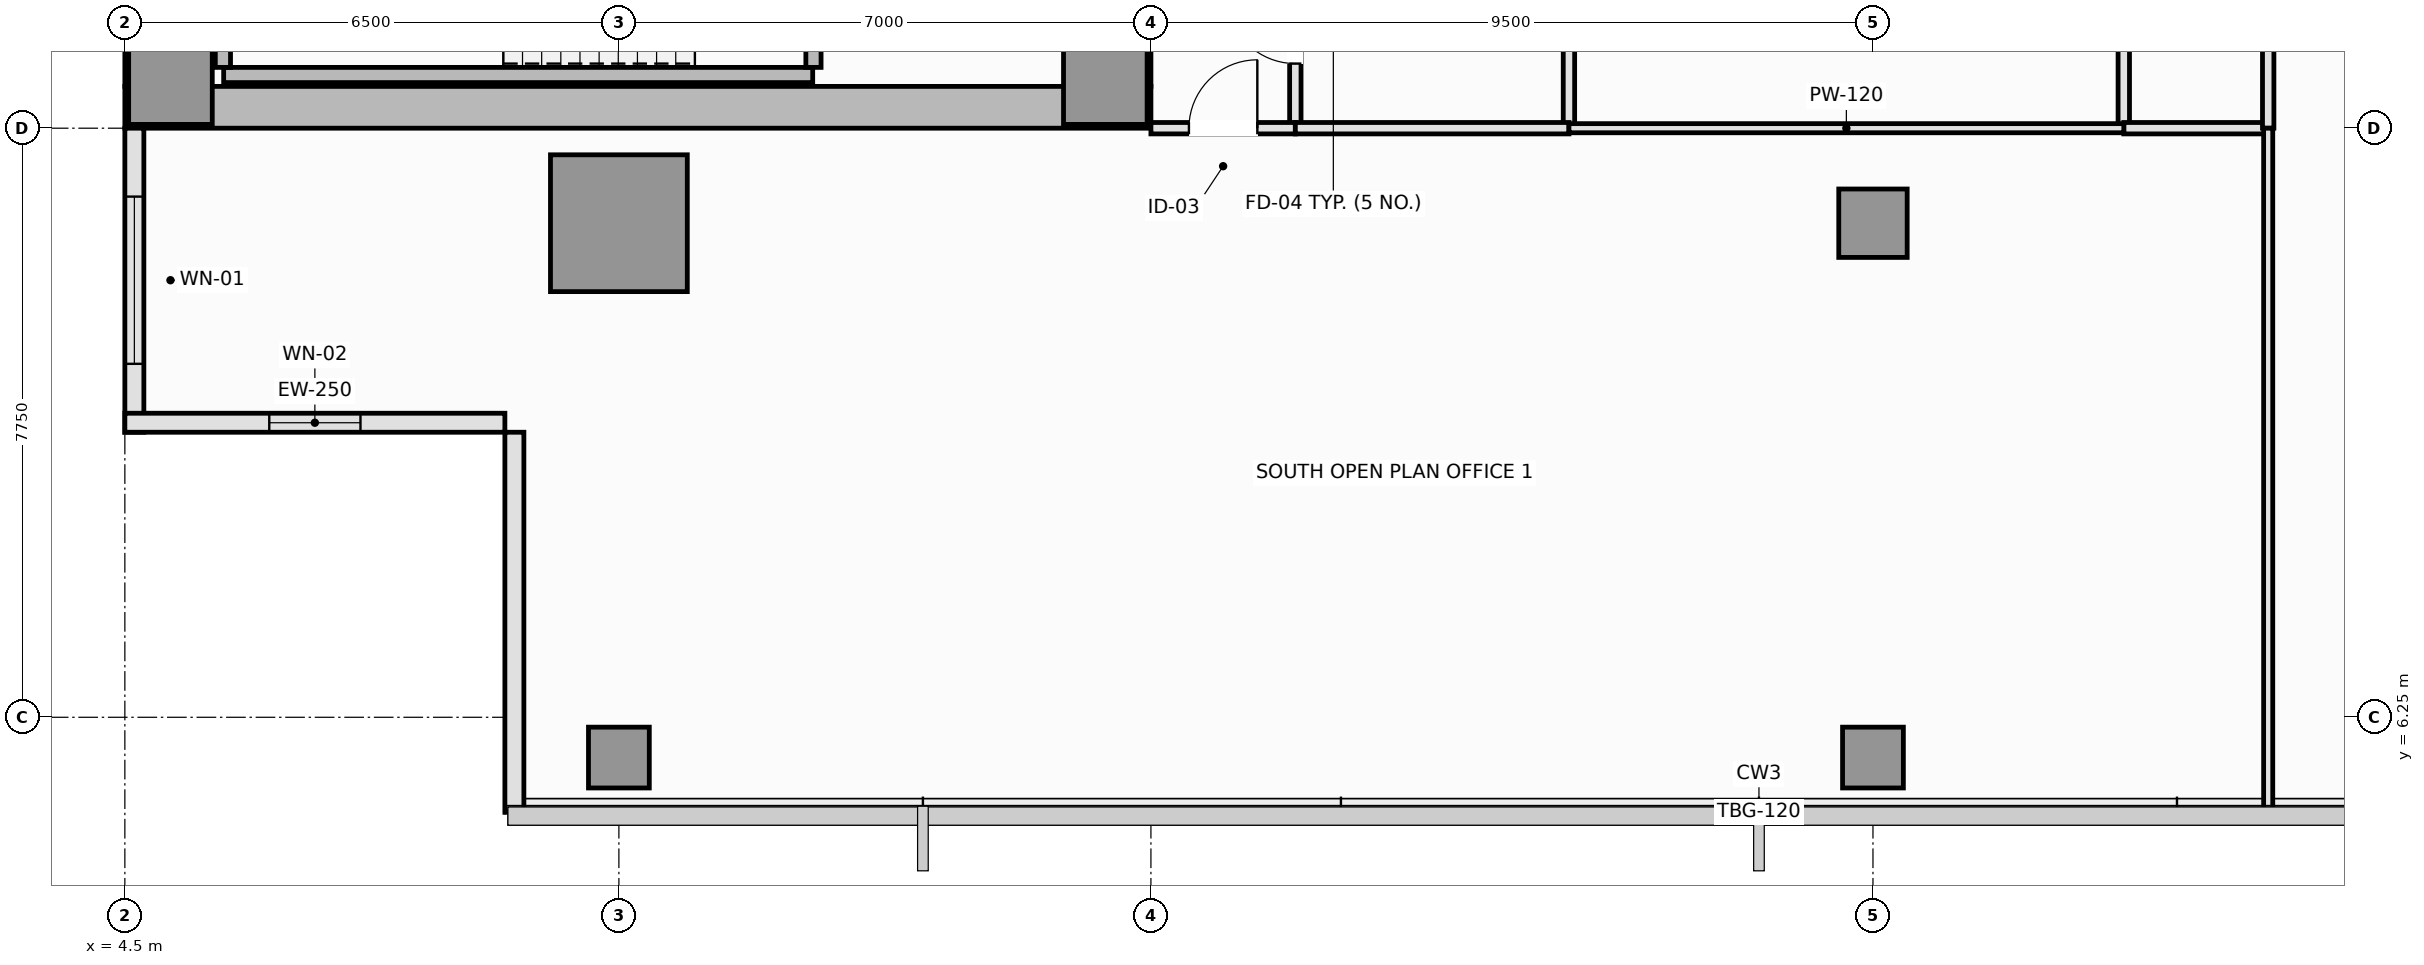
"""IFC4 building model, lengths in metres.
Left out: names, types, materials, properties, quantities, classifications, styles, units other than length and angle.
Written with IfcOpenShell. Run it as: python <this file> out.ifc"""

import sys

from ifc_helpers import new_model, si_unit, direction, frame, frame_2d, origin, origin_2d, place, context, subcontext, project, spatial, rectangle, extrude, element, fill, save


model = new_model("IFC4")
c1 = context("Model", 3, precision=1e-05, world=origin(), true_north=direction((0.0, 1.0)))
c2 = subcontext(c1, "Body", "Model", "MODEL_VIEW")
j1 = project(units=[si_unit("LENGTHUNIT", "METRE"), si_unit("PLANEANGLEUNIT", "RADIAN")], contexts=[c1])
p1 = place(None, origin())
s1 = spatial("IfcSite", under=j1, at=p1, CompositionType="ELEMENT")
p2 = place(p1, origin())
s2 = spatial("IfcBuilding", under=s1, at=p2, CompositionType="ELEMENT")
p3 = place(p2, frame((0.0, 0.0, 188.05)))
s3 = spatial("IfcBuildingStorey", under=s2, at=p3, CompositionType="ELEMENT", Elevation=188.05)
p4 = place(p3, frame((4.5, 14.275, 0.0), z_axis=(0.0, 0.0, 1.0), x_axis=(1.0, 0.0, 0.0)))
e1 = element("IfcWall", 1, at=p4, inside=s3, PredefinedType="SHEAR", context=c2, shape_type="SweptSolid", body=[
    extrude(rectangle(XDim=13.5, YDim=0.55, at=frame_2d((6.75, 0.0))), origin(), (0.0, 0.0, 1.0), 3.55),
])
p5 = place(p3, frame((4.775, 14.55, 0.0), z_axis=(0.0, 0.0, 1.0), x_axis=(0.0, 1.0, 0.0)))
e2 = element("IfcWall", 2, at=p5, inside=s3, PredefinedType="SHEAR", context=c2, shape_type="SweptSolid", body=[
    extrude(rectangle(XDim=21.4, YDim=0.55, at=frame_2d((10.7, 0.0))), origin(), (0.0, 0.0, 1.0), 3.55),
])
p6 = place(p3, frame((17.725, 14.55, 0.0), z_axis=(0.0, 0.0, 1.0), x_axis=(0.0, 1.0, 0.0)))
e3 = element("IfcWall", 3, at=p6, inside=s3, PredefinedType="SHEAR", context=c2, shape_type="SweptSolid", body=[
    extrude(rectangle(XDim=8.9, YDim=0.55, at=frame_2d((4.45, 0.0))), origin(), (0.0, 0.0, 1.0), 3.55),
])
p7 = place(p6, frame((4.35, 0.0, 0.0)))
e4 = element("IfcOpeningElement", 4, at=p7, cuts=e3, PredefinedType="OPENING", context=c2, shape_type="SweptSolid", body=[
    extrude(rectangle(XDim=1.1, YDim=2.15, at=frame_2d((0.55, 1.075))), frame((0.0, 0.285, 0.0), z_axis=(0.0, -1.0, 0.0), x_axis=(1.0, 0.0, 0.0)), (0.0, 0.0, 1.0), 0.57),
])
for number, where, z_axis, x_axis in (
    (5, (5.1, 14.6, 0.0), (0.0, 0.0, 1.0), (1.0, 0.0, 0.0)),
    (6, (17.4, 14.6, 0.0), (0.0, 0.0, 1.0), (1.0, 0.0, 0.0)),
):
    element("IfcColumn", number, at=place(p3, frame(where, z_axis=z_axis, x_axis=x_axis)), inside=s3, PredefinedType="PILASTER", context=c2, shape_type="SweptSolid", body=[
        extrude(rectangle(XDim=1.1, YDim=1.1, at=origin_2d()), origin(), (0.0, 0.0, 1.0), 3.55),
    ])
p8 = place(p3, frame((11.0, 12.75, 0.0), z_axis=(0.0, 0.0, 1.0), x_axis=(1.0, 0.0, 0.0)))
e7 = element("IfcColumn", 7, at=p8, inside=s3, PredefinedType="COLUMN", context=c2, shape_type="SweptSolid", body=[
    extrude(rectangle(XDim=1.8, YDim=1.8, at=origin_2d()), origin(), (0.0, 0.0, 1.0), 3.55),
])
p9 = place(p3, frame((27.5, 12.75, 0.0), z_axis=(0.0, 0.0, 1.0), x_axis=(1.0, 0.0, 0.0)))
e8 = element("IfcColumn", 8, at=p9, inside=s3, PredefinedType="COLUMN", context=c2, shape_type="SweptSolid", body=[
    extrude(rectangle(XDim=0.9, YDim=0.9, at=origin_2d()), origin(), (0.0, 0.0, 1.0), 3.55),
])
for number, where, z_axis, x_axis in (
    (9, (11.0, 5.72, 0.0), (0.0, 0.0, 1.0), (1.0, 0.0, 0.0)),
    (10, (27.5, 5.72, 0.0), (0.0, 0.0, 1.0), (1.0, 0.0, 0.0)),
):
    element("IfcColumn", number, at=place(p3, frame(where, z_axis=z_axis, x_axis=x_axis)), inside=s3, PredefinedType="COLUMN", context=c2, shape_type="SweptSolid", body=[
        extrude(rectangle(XDim=0.8, YDim=0.8, at=origin_2d()), origin(), (0.0, 0.0, 1.0), 3.55),
    ])
p10 = place(p3, frame((4.625, 14.0, 0.0), z_axis=(0.0, 0.0, 1.0), x_axis=(0.0, -1.0, 0.0)))
e11 = element("IfcWall", 11, at=p10, inside=s3, PredefinedType="SOLIDWALL", context=c2, shape_type="SweptSolid", body=[
    extrude(rectangle(XDim=4.0, YDim=0.25, at=frame_2d((2.0, 0.0))), origin(), (0.0, 0.0, 1.0), 3.37),
])
p11 = place(p10, frame((0.9, 0.0, 0.9)))
e12 = element("IfcOpeningElement", 12, at=p11, cuts=e11, PredefinedType="OPENING", context=c2, shape_type="SweptSolid", body=[
    extrude(rectangle(XDim=2.2, YDim=1.8, at=frame_2d((1.1, 0.9))), frame((0.0, 0.135, 0.0), z_axis=(0.0, -1.0, 0.0), x_axis=(1.0, 0.0, 0.0)), (0.0, 0.0, 1.0), 0.27),
])
p12 = place(p3, frame((4.5, 10.125, 0.0), z_axis=(0.0, 0.0, 1.0), x_axis=(1.0, 0.0, 0.0)))
e13 = element("IfcWall", 13, at=p12, inside=s3, PredefinedType="SOLIDWALL", context=c2, shape_type="SweptSolid", body=[
    extrude(rectangle(XDim=5.0, YDim=0.25, at=frame_2d((2.5, 0.0))), origin(), (0.0, 0.0, 1.0), 3.37),
])
p13 = place(p12, frame((1.9, 0.0, 0.9)))
e14 = element("IfcOpeningElement", 14, at=p13, cuts=e13, PredefinedType="OPENING", context=c2, shape_type="SweptSolid", body=[
    extrude(rectangle(XDim=1.2, YDim=1.8, at=frame_2d((0.6, 0.9))), frame((0.0, 0.135, 0.0), z_axis=(0.0, -1.0, 0.0), x_axis=(1.0, 0.0, 0.0)), (0.0, 0.0, 1.0), 0.27),
])
p14 = place(p3, frame((9.625, 10.0, 0.0), z_axis=(0.0, 0.0, 1.0), x_axis=(0.0, -1.0, 0.0)))
e15 = element("IfcWall", 15, at=p14, inside=s3, PredefinedType="SOLIDWALL", context=c2, shape_type="SweptSolid", body=[
    extrude(rectangle(XDim=5.0, YDim=0.25, at=frame_2d((2.5, 0.0))), origin(), (0.0, 0.0, 1.0), 3.37),
])
p15 = place(p3, frame((5.8, 14.7, 0.0), z_axis=(0.0, 0.0, 1.0), x_axis=(1.0, 0.0, 0.0)))
e16 = element("IfcWall", 16, at=p15, inside=s3, PredefinedType="SOLIDWALL", context=c2, shape_type="SweptSolid", body=[
    extrude(rectangle(XDim=7.75, YDim=0.2, at=frame_2d((3.875, 0.0))), origin(), (0.0, 0.0, 1.0), 3.55),
])
p16 = place(p3, frame((5.79, 14.8, 0.0), z_axis=(0.0, 0.0, 1.0), x_axis=(0.0, 1.0, 0.0)))
e17 = element("IfcWall", 17, at=p16, inside=s3, PredefinedType="SOLIDWALL", context=c2, shape_type="SweptSolid", body=[
    extrude(rectangle(XDim=3.05, YDim=0.2, at=frame_2d((1.525, 0.0))), origin(), (0.0, 0.0, 1.0), 3.55),
])
p17 = place(p3, frame((13.56, 14.8, 0.0), z_axis=(0.0, 0.0, 1.0), x_axis=(0.0, 1.0, 0.0)))
e18 = element("IfcWall", 18, at=p17, inside=s3, PredefinedType="SOLIDWALL", context=c2, shape_type="SweptSolid", body=[
    extrude(rectangle(XDim=3.05, YDim=0.2, at=frame_2d((1.525, 0.0))), origin(), (0.0, 0.0, 1.0), 3.55),
])
p18 = place(p17, frame((0.95, 0.0, 0.0)))
e19 = element("IfcOpeningElement", 19, at=p18, cuts=e18, PredefinedType="OPENING", context=c2, shape_type="SweptSolid", body=[
    extrude(rectangle(XDim=1.15, YDim=2.15, at=frame_2d((0.575, 1.075))), frame((0.0, 0.11, 0.0), z_axis=(0.0, -1.0, 0.0), x_axis=(1.0, 0.0, 0.0)), (0.0, 0.0, 1.0), 0.22),
])
p19 = place(p3, frame((19.9, 14.0, 0.0), z_axis=(0.0, 0.0, 1.0), x_axis=(0.0, 1.0, 0.0)))
e20 = element("IfcWall", 20, at=p19, inside=s3, PredefinedType="PLUMBINGWALL", context=c2, shape_type="SweptSolid", body=[
    extrude(rectangle(XDim=2.6, YDim=0.15, at=frame_2d((1.3, 0.0))), origin(), (0.0, 0.0, 1.0), 3.37),
])
p20 = place(p19, frame((0.85, 0.0, 0.0)))
e21 = element("IfcOpeningElement", 21, at=p20, cuts=e20, PredefinedType="OPENING", context=c2, shape_type="SweptSolid", body=[
    extrude(rectangle(XDim=0.9, YDim=2.1, at=frame_2d((0.45, 1.05))), frame((0.0, 0.085, 0.0), z_axis=(0.0, -1.0, 0.0), x_axis=(1.0, 0.0, 0.0)), (0.0, 0.0, 1.0), 0.17),
])
p21 = place(p3, frame((18.0, 14.0, 0.0), z_axis=(0.0, 0.0, 1.0), x_axis=(1.0, 0.0, 0.0)))
e22 = element("IfcWall", 22, at=p21, inside=s3, PredefinedType="PARTITIONING", context=c2, shape_type="SweptSolid", body=[
    extrude(rectangle(XDim=1.9, YDim=0.15, at=frame_2d((0.95, 0.0))), origin(), (0.0, 0.0, 1.0), 3.37),
])
p22 = place(p21, frame((0.5, 0.0, 0.0)))
e23 = element("IfcOpeningElement", 23, at=p22, cuts=e22, PredefinedType="OPENING", context=c2, shape_type="SweptSolid", body=[
    extrude(rectangle(XDim=0.9, YDim=2.1, at=frame_2d((0.45, 1.05))), frame((0.0, 0.085, 0.0), z_axis=(0.0, -1.0, 0.0), x_axis=(1.0, 0.0, 0.0)), (0.0, 0.0, 1.0), 0.17),
])
p23 = place(p3, frame((30.8, 14.0, 0.0), z_axis=(0.0, 0.0, 1.0), x_axis=(0.0, 1.0, 0.0)))
e24 = element("IfcWall", 24, at=p23, inside=s3, PredefinedType="PARTITIONING", context=c2, shape_type="SweptSolid", body=[
    extrude(rectangle(XDim=4.7, YDim=0.15, at=frame_2d((2.35, 0.0))), origin(), (0.0, 0.0, 1.0), 3.37),
])
p24 = place(p23, frame((1.85, 0.0, 0.0)))
e25 = element("IfcOpeningElement", 25, at=p24, cuts=e24, PredefinedType="OPENING", context=c2, shape_type="SweptSolid", body=[
    extrude(rectangle(XDim=1.0, YDim=2.15, at=frame_2d((0.5, 1.075))), frame((0.0, 0.085, 0.0), z_axis=(0.0, -1.0, 0.0), x_axis=(1.0, 0.0, 0.0)), (0.0, 0.0, 1.0), 0.17),
])
p25 = place(p3, frame((30.8, 14.0, 0.0), z_axis=(0.0, 0.0, 1.0), x_axis=(1.0, 0.0, 0.0)))
e26 = element("IfcWall", 26, at=p25, inside=s3, PredefinedType="PARTITIONING", context=c2, shape_type="SweptSolid", body=[
    extrude(rectangle(XDim=1.9, YDim=0.15, at=frame_2d((0.95, 0.0))), origin(), (0.0, 0.0, 1.0), 3.37),
])
p26 = place(p3, frame((32.7, 14.0, 0.0), z_axis=(0.0, 0.0, 1.0), x_axis=(0.0, 1.0, 0.0)))
e27 = element("IfcWall", 27, at=p26, inside=s3, PredefinedType="PARTITIONING", context=c2, shape_type="SweptSolid", body=[
    extrude(rectangle(XDim=11.25, YDim=0.15, at=frame_2d((5.625, 0.0))), origin(), (0.0, 0.0, 1.0), 3.37),
])
p27 = place(p26, frame((5.125, 0.0, 0.0)))
e28 = element("IfcOpeningElement", 28, at=p27, cuts=e27, PredefinedType="OPENING", context=c2, shape_type="SweptSolid", body=[
    extrude(rectangle(XDim=1.0, YDim=2.15, at=frame_2d((0.5, 1.075))), frame((0.0, 0.085, 0.0), z_axis=(0.0, -1.0, 0.0), x_axis=(1.0, 0.0, 0.0)), (0.0, 0.0, 1.0), 0.17),
])
p28 = place(p3, frame((23.5, 14.0, 0.0), z_axis=(0.0, 0.0, 1.0), x_axis=(0.0, 1.0, 0.0)))
e29 = element("IfcWall", 29, at=p28, inside=s3, PredefinedType="PLUMBINGWALL", context=c2, shape_type="SweptSolid", body=[
    extrude(rectangle(XDim=2.6, YDim=0.15, at=frame_2d((1.3, 0.0))), origin(), (0.0, 0.0, 1.0), 3.37),
])
p29 = place(p3, frame((19.9, 14.0, 0.0), z_axis=(0.0, 0.0, 1.0), x_axis=(1.0, 0.0, 0.0)))
e30 = element("IfcWall", 30, at=p29, inside=s3, PredefinedType="PLUMBINGWALL", context=c2, shape_type="SweptSolid", body=[
    extrude(rectangle(XDim=3.6, YDim=0.15, at=frame_2d((1.8, 0.0))), origin(), (0.0, 0.0, 1.0), 3.37),
])
p30 = place(p3, frame((23.5, 14.0, 0.0), z_axis=(0.0, 0.0, 1.0), x_axis=(1.0, 0.0, 0.0)))
e31 = element("IfcWall", 31, at=p30, inside=s3, PredefinedType="PARTITIONING", context=c2, shape_type="SweptSolid", body=[
    extrude(rectangle(XDim=7.3, YDim=0.12, at=frame_2d((3.65, 0.0))), origin(), (0.0, 0.0, 1.0), 3.37),
])
p31 = place(p3, frame((32.7, 5.01, 0.0), z_axis=(0.0, 0.0, 1.0), x_axis=(0.0, 1.0, 0.0)))
e32 = element("IfcWall", 32, at=p31, inside=s3, PredefinedType="PARTITIONING", context=c2, shape_type="SweptSolid", body=[
    extrude(rectangle(XDim=8.99, YDim=0.12, at=frame_2d((4.495, 0.0))), origin(), (0.0, 0.0, 1.0), 3.37),
])
p32 = place(p11, origin())
e33 = element("IfcWindow", 33, at=p32, inside=s3, PartitioningType="SINGLE_PANEL", PredefinedType="WINDOW", context=c2, shape_type="SweptSolid", body=[
    extrude(rectangle(XDim=2.2, YDim=1.8, at=frame_2d((1.1, 0.9))), frame((0.0, 0.03, 0.0), z_axis=(0.0, -1.0, 0.0), x_axis=(1.0, 0.0, 0.0)), (0.0, 0.0, 1.0), 0.06),
])
fill(e12, e33)
p33 = place(p13, origin())
e34 = element("IfcWindow", 34, at=p33, inside=s3, PartitioningType="SINGLE_PANEL", PredefinedType="WINDOW", context=c2, shape_type="SweptSolid", body=[
    extrude(rectangle(XDim=1.2, YDim=1.8, at=frame_2d((0.6, 0.9))), frame((0.0, 0.03, 0.0), z_axis=(0.0, -1.0, 0.0), x_axis=(1.0, 0.0, 0.0)), (0.0, 0.0, 1.0), 0.06),
])
fill(e14, e34)
p34 = place(p20, origin())
e35 = element("IfcDoor", 35, at=p34, inside=s3, OperationType="SINGLE_SWING_RIGHT", PredefinedType="DOOR", context=c2, shape_type="SweptSolid", body=[
    extrude(rectangle(XDim=0.9, YDim=2.1, at=frame_2d((0.45, 1.05))), frame((0.0, 0.025, 0.0), z_axis=(0.0, -1.0, 0.0), x_axis=(1.0, 0.0, 0.0)), (0.0, 0.0, 1.0), 0.05),
])
fill(e21, e35)
p35 = place(p22, origin())
e36 = element("IfcDoor", 36, at=p35, inside=s3, OperationType="SINGLE_SWING_RIGHT", PredefinedType="DOOR", context=c2, shape_type="SweptSolid", body=[
    extrude(rectangle(XDim=0.9, YDim=2.1, at=frame_2d((0.45, 1.05))), frame((0.0, 0.025, 0.0), z_axis=(0.0, -1.0, 0.0), x_axis=(1.0, 0.0, 0.0)), (0.0, 0.0, 1.0), 0.05),
])
fill(e23, e36)
save(model, sys.argv[1])
